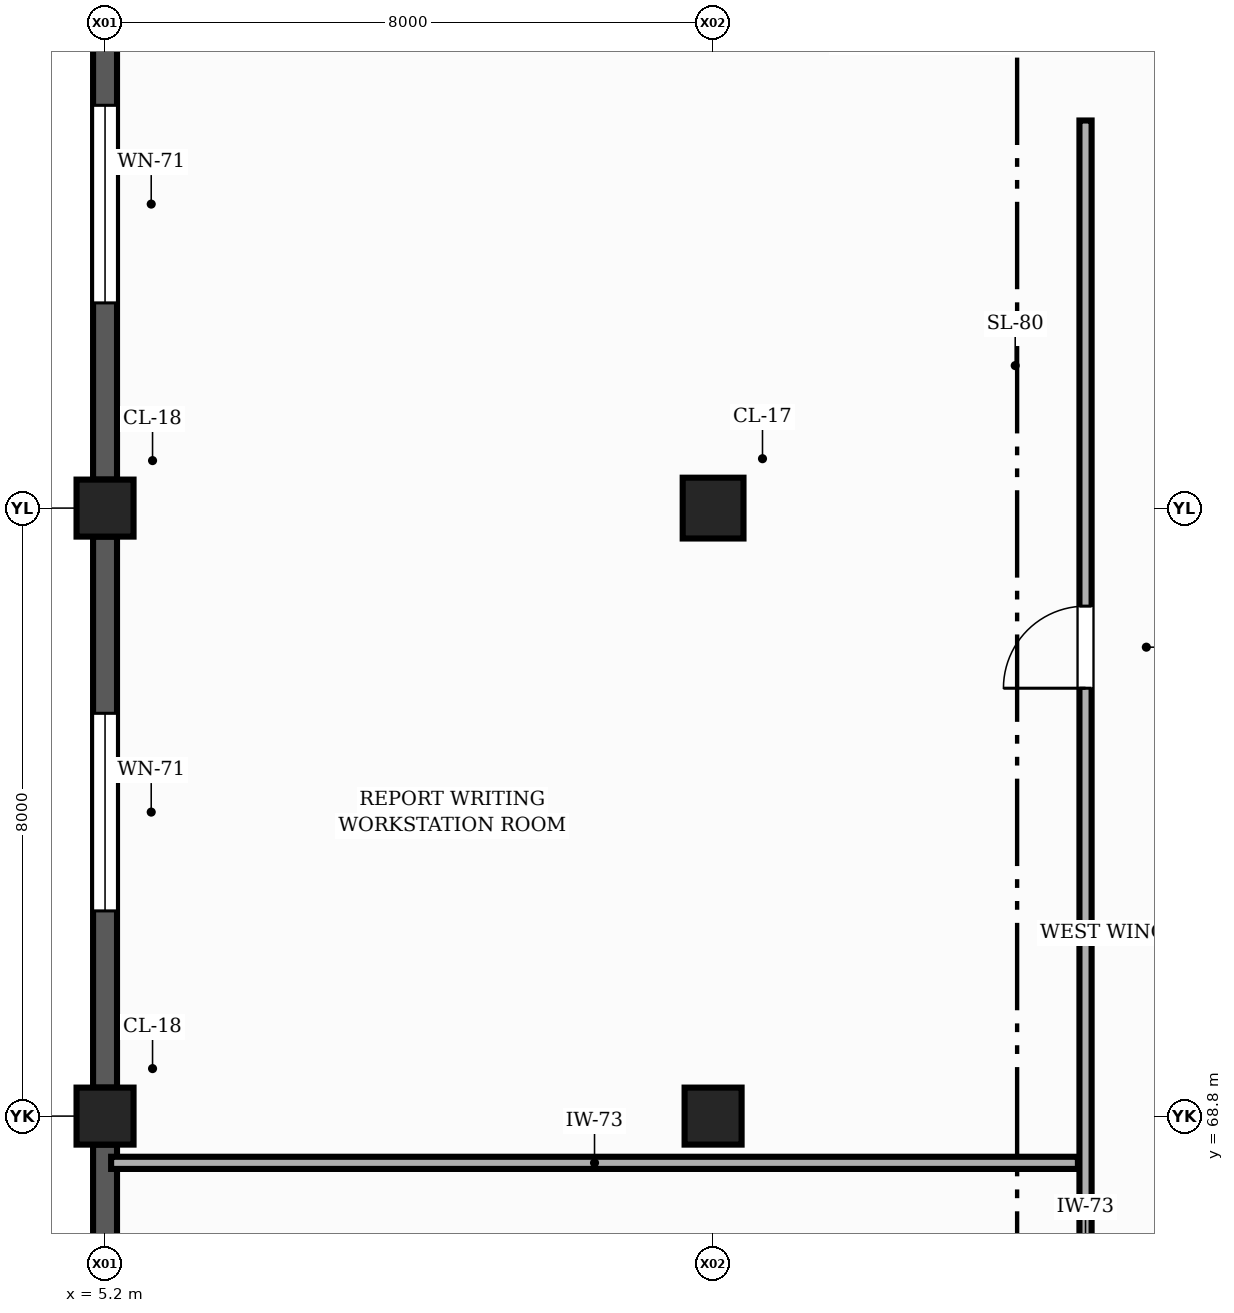
"""IFC4 building model, lengths in metres.
Left out: names, types, materials, properties, quantities, classifications, styles, units other than length and angle.
Written with IfcOpenShell. Run it as: python <this file> out.ifc"""

import sys

from ifc_helpers import new_model, si_unit, direction, frame, frame_2d, origin, origin_2d, place, context, subcontext, project, spatial, rectangle, extrude, element, fill, save


model = new_model("IFC4")
c1 = context("Model", 3, precision=1e-05, world=origin(), true_north=direction((0.0, 1.0)))
c2 = subcontext(c1, "Body", "Model", "MODEL_VIEW")
j1 = project(units=[si_unit("LENGTHUNIT", "METRE"), si_unit("PLANEANGLEUNIT", "RADIAN")], contexts=[c1])
p1 = place(None, origin())
s1 = spatial("IfcSite", under=j1, at=p1, CompositionType="ELEMENT")
p2 = place(p1, origin())
s2 = spatial("IfcBuilding", under=s1, at=p2, CompositionType="ELEMENT")
p3 = place(p2, origin())
s3 = spatial("IfcBuildingStorey", under=s2, at=p3, CompositionType="ELEMENT", Elevation=0.0)
for number, where, z_axis, x_axis in (
    (1, (5.2, 68.8, 0.0), (0.0, 0.0, 1.0), (1.0, 0.0, 0.0)),
    (2, (5.2, 76.8, 0.0), (0.0, 0.0, 1.0), (1.0, 0.0, 0.0)),
    (3, (13.2, 68.8, 0.0), (0.0, 0.0, 1.0), (1.0, 0.0, 0.0)),
):
    element("IfcColumn", number, at=place(p3, frame(where, z_axis=z_axis, x_axis=x_axis)), inside=s3, PredefinedType="COLUMN", context=c2, shape_type="SweptSolid", body=[
        extrude(rectangle(XDim=0.75, YDim=0.75, at=origin_2d()), origin(), (0.0, 0.0, 1.0), 4.8),
    ])
p4 = place(p3, frame((13.2, 76.8, 0.0), z_axis=(0.0, 0.0, 1.0), x_axis=(1.0, 0.0, 0.0)))
e4 = element("IfcColumn", 4, at=p4, inside=s3, PredefinedType="COLUMN", context=c2, shape_type="SweptSolid", body=[
    extrude(rectangle(XDim=0.8, YDim=0.8, at=origin_2d()), origin(), (0.0, 0.0, 1.0), 4.8),
])
p5 = place(p3, frame((5.2, 84.425, 0.0), z_axis=(0.0, 0.0, 1.0), x_axis=(0.0, -1.0, 0.0)))
e5 = element("IfcWall", 5, at=p5, inside=s3, PredefinedType="SOLIDWALL", context=c2, shape_type="SweptSolid", body=[
    extrude(rectangle(XDim=7.25, YDim=0.315, at=frame_2d((3.625, 0.0))), origin(), (0.0, 0.0, 1.0), 3.88),
])
p6 = place(p5, frame((2.325, 0.0, 0.9)))
e6 = element("IfcOpeningElement", 6, at=p6, cuts=e5, PredefinedType="OPENING", context=c2, shape_type="SweptSolid", body=[
    extrude(rectangle(XDim=2.6, YDim=1.8, at=frame_2d((1.3, 0.9))), frame((0.0, 0.167, 0.0), z_axis=(0.0, -1.0, 0.0), x_axis=(1.0, 0.0, 0.0)), (0.0, 0.0, 1.0), 0.335),
])
p7 = place(p3, frame((5.2, 76.425, 0.0), z_axis=(0.0, 0.0, 1.0), x_axis=(0.0, -1.0, 0.0)))
e7 = element("IfcWall", 7, at=p7, inside=s3, PredefinedType="SOLIDWALL", context=c2, shape_type="SweptSolid", body=[
    extrude(rectangle(XDim=7.25, YDim=0.315, at=frame_2d((3.625, 0.0))), origin(), (0.0, 0.0, 1.0), 3.88),
])
p8 = place(p7, frame((2.325, 0.0, 0.9)))
e8 = element("IfcOpeningElement", 8, at=p8, cuts=e7, PredefinedType="OPENING", context=c2, shape_type="SweptSolid", body=[
    extrude(rectangle(XDim=2.6, YDim=1.8, at=frame_2d((1.3, 0.9))), frame((0.0, 0.167, 0.0), z_axis=(0.0, -1.0, 0.0), x_axis=(1.0, 0.0, 0.0)), (0.0, 0.0, 1.0), 0.335),
])
p9 = place(p3, frame((5.2, 68.425, 0.0), z_axis=(0.0, 0.0, 1.0), x_axis=(0.0, -1.0, 0.0)))
e9 = element("IfcWall", 9, at=p9, inside=s3, PredefinedType="SOLIDWALL", context=c2, shape_type="SweptSolid", body=[
    extrude(rectangle(XDim=7.25, YDim=0.315, at=frame_2d((3.625, 0.0))), origin(), (0.0, 0.0, 1.0), 3.88),
])
p10 = place(p9, frame((2.325, 0.0, 0.9)))
e10 = element("IfcOpeningElement", 10, at=p10, cuts=e9, PredefinedType="OPENING", context=c2, shape_type="SweptSolid", body=[
    extrude(rectangle(XDim=2.6, YDim=1.8, at=frame_2d((1.3, 0.9))), frame((0.0, 0.167, 0.0), z_axis=(0.0, -1.0, 0.0), x_axis=(1.0, 0.0, 0.0)), (0.0, 0.0, 1.0), 0.335),
])
p11 = place(p3, frame((5.28, 68.185, 0.0), z_axis=(0.0, 0.0, 1.0), x_axis=(1.0, 0.0, 0.0)))
e11 = element("IfcWall", 11, at=p11, inside=s3, PredefinedType="PARTITIONING", context=c2, shape_type="SweptSolid", body=[
    extrude(rectangle(XDim=12.72, YDim=0.16, at=frame_2d((6.36, 0.0))), origin(), (0.0, 0.0, 1.0), 3.865),
])
p12 = place(p3, frame((18.1, 52.2, 0.0), z_axis=(0.0, 0.0, 1.0), x_axis=(0.0, 1.0, 0.0)))
e12 = element("IfcWall", 12, at=p12, inside=s3, PredefinedType="PARTITIONING", context=c2, shape_type="SweptSolid", body=[
    extrude(rectangle(XDim=29.7, YDim=0.16, at=frame_2d((14.85, 0.0))), origin(), (0.0, 0.0, 1.0), 3.865),
])
p13 = place(p12, frame((7.4, 0.0, 0.0)))
e13 = element("IfcOpeningElement", 13, at=p13, cuts=e12, PredefinedType="OPENING", context=c2, shape_type="SweptSolid", body=[
    extrude(rectangle(XDim=1.05, YDim=2.1, at=frame_2d((0.525, 1.05))), frame((0.0, 0.09, 0.0), z_axis=(0.0, -1.0, 0.0), x_axis=(1.0, 0.0, 0.0)), (0.0, 0.0, 1.0), 0.18),
])
p14 = place(p12, frame((22.23, 0.0, 0.0)))
e14 = element("IfcOpeningElement", 14, at=p14, cuts=e12, PredefinedType="OPENING", context=c2, shape_type="SweptSolid", body=[
    extrude(rectangle(XDim=1.08, YDim=2.14, at=frame_2d((0.54, 1.07))), frame((0.0, 0.09, 0.0), z_axis=(0.0, -1.0, 0.0), x_axis=(1.0, 0.0, 0.0)), (0.0, 0.0, 1.0), 0.18),
])
p15 = place(p6, origin())
e15 = element("IfcWindow", 15, at=p15, inside=s3, PartitioningType="SINGLE_PANEL", PredefinedType="WINDOW", context=c2, shape_type="SweptSolid", body=[
    extrude(rectangle(XDim=2.6, YDim=1.8, at=frame_2d((1.3, 0.9))), frame((0.0, 0.03, 0.0), z_axis=(0.0, -1.0, 0.0), x_axis=(1.0, 0.0, 0.0)), (0.0, 0.0, 1.0), 0.06),
])
fill(e6, e15)
p16 = place(p8, origin())
e16 = element("IfcWindow", 16, at=p16, inside=s3, PartitioningType="SINGLE_PANEL", PredefinedType="WINDOW", context=c2, shape_type="SweptSolid", body=[
    extrude(rectangle(XDim=2.6, YDim=1.8, at=frame_2d((1.3, 0.9))), frame((0.0, 0.03, 0.0), z_axis=(0.0, -1.0, 0.0), x_axis=(1.0, 0.0, 0.0)), (0.0, 0.0, 1.0), 0.06),
])
fill(e8, e16)
p17 = place(p14, origin())
e17 = element("IfcDoor", 17, at=p17, inside=s3, OperationType="SINGLE_SWING_LEFT", PredefinedType="DOOR", context=c2, shape_type="SweptSolid", body=[
    extrude(rectangle(XDim=1.08, YDim=2.14, at=frame_2d((0.54, 1.07))), frame((0.0, 0.025, 0.0), z_axis=(0.0, -1.0, 0.0), x_axis=(1.0, 0.0, 0.0)), (0.0, 0.0, 1.0), 0.05),
])
fill(e14, e17)
save(model, sys.argv[1])
